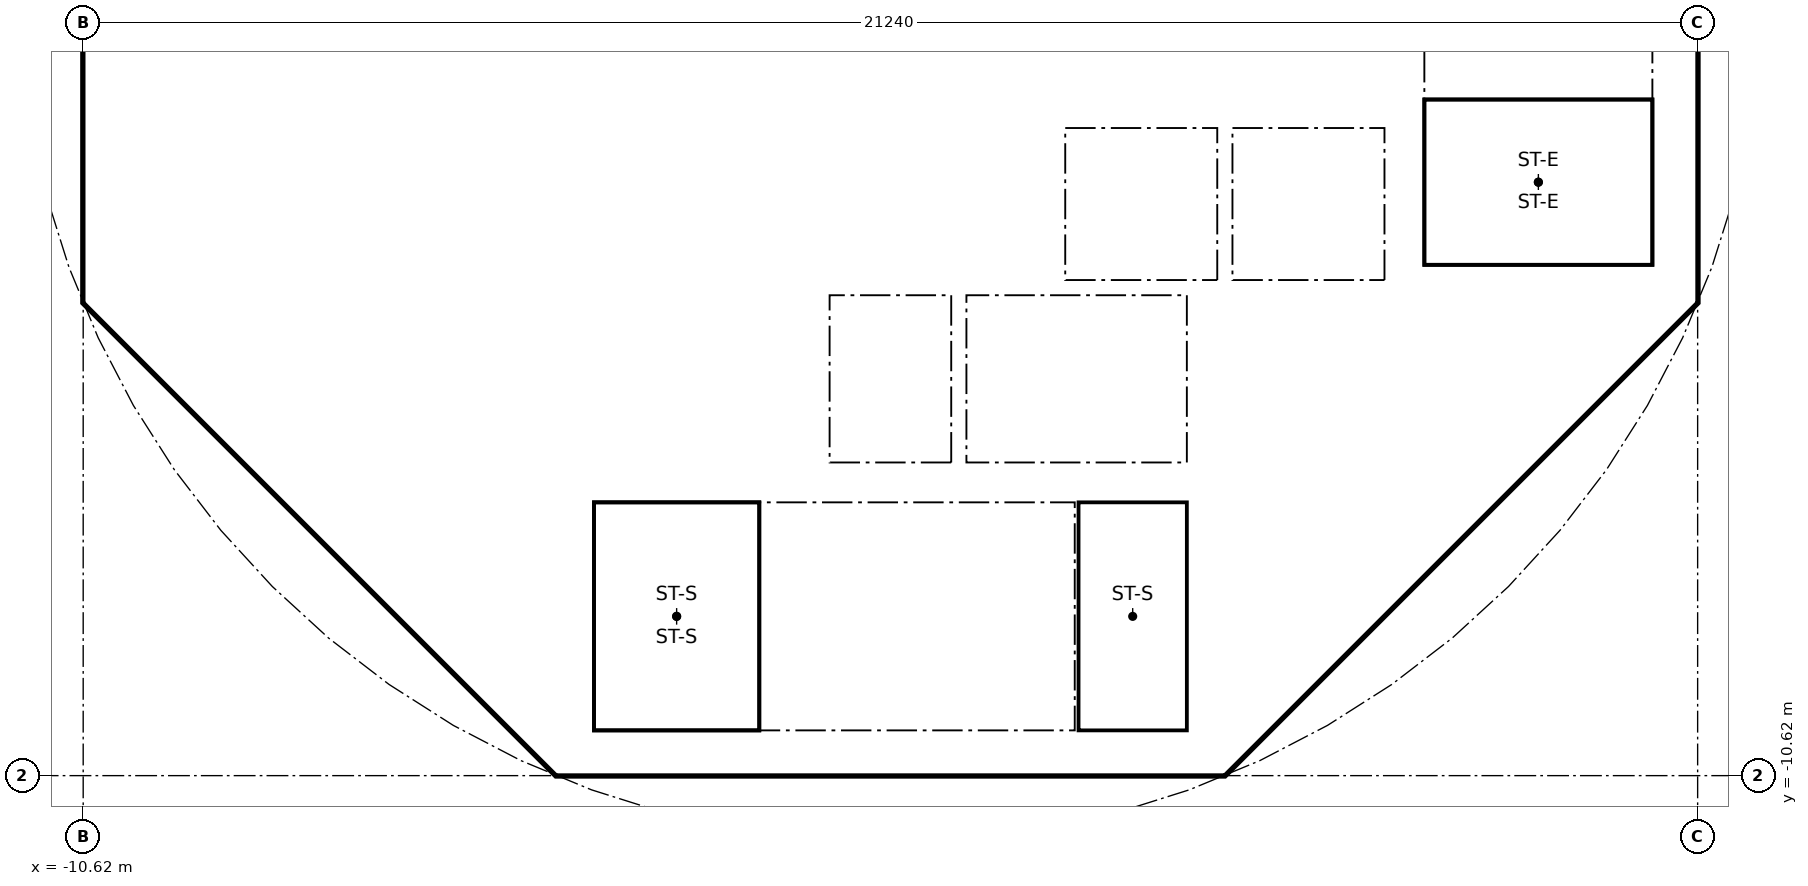
"""IFC4 building model, lengths in metres.
Left out: names, types, materials, properties, quantities, classifications, styles, units other than length and angle.
Written with IfcOpenShell. Run it as: python <this file> out.ifc"""

import sys

from ifc_helpers import new_model, si_unit, direction, frame, frame_2d, origin, place, context, subcontext, project, spatial, polyline, rectangle, outline, extrude, element, fill, save


model = new_model("IFC4")
c1 = context("Model", 3, precision=1e-05, world=origin(), true_north=direction((0.0, 1.0)))
c2 = subcontext(c1, "Body", "Model", "MODEL_VIEW")
j1 = project(units=[si_unit("LENGTHUNIT", "METRE"), si_unit("PLANEANGLEUNIT", "RADIAN")], contexts=[c1])
p1 = place(None, origin())
s1 = spatial("IfcSite", under=j1, at=p1, CompositionType="ELEMENT")
p2 = place(p1, origin())
s2 = spatial("IfcBuilding", under=s1, at=p2, CompositionType="ELEMENT")
p3 = place(p2, frame((0.0, 0.0, 299.2)))
s3 = spatial("IfcBuildingStorey", under=s2, at=p3, CompositionType="ELEMENT", Elevation=299.2)
p4 = place(p3, frame((-10.325, 3.801, 0.0), z_axis=(0.0, 0.0, 1.0), x_axis=(0.0, -1.0, 0.0)))
e1 = element("IfcWall", 1, at=p4, inside=s3, PredefinedType="SHEAR", context=c2, shape_type="SweptSolid", body=[
    extrude(rectangle(XDim=7.602, YDim=0.6, at=frame_2d((3.801, 0.0))), origin(), (0.0, 0.0, 1.0), 10.75),
])
p5 = place(p4, frame((0.651, 0.0, 0.0)))
e2 = element("IfcOpeningElement", 2, at=p5, cuts=e1, PredefinedType="OPENING", context=c2, shape_type="SweptSolid", body=[
    extrude(rectangle(XDim=1.5, YDim=2.1, at=frame_2d((0.75, 1.05))), frame((0.0, 0.31, 0.0), z_axis=(0.0, -1.0, 0.0), x_axis=(1.0, 0.0, 0.0)), (0.0, 0.0, 1.0), 0.62),
])
p6 = place(p4, frame((5.451, 0.0, 0.0)))
e3 = element("IfcOpeningElement", 3, at=p6, cuts=e1, PredefinedType="OPENING", context=c2, shape_type="SweptSolid", body=[
    extrude(rectangle(XDim=1.5, YDim=2.1, at=frame_2d((0.75, 1.05))), frame((0.0, 0.31, 0.0), z_axis=(0.0, -1.0, 0.0), x_axis=(1.0, 0.0, 0.0)), (0.0, 0.0, 1.0), 0.62),
])
p7 = place(p3, frame((-9.988, -4.613, 0.0), z_axis=(0.0, 0.0, 1.0), x_axis=(0.707106781187, -0.707106781187, 0.0)))
e4 = element("IfcWall", 4, at=p7, inside=s3, PredefinedType="SHEAR", context=c2, shape_type="SweptSolid", body=[
    extrude(rectangle(XDim=7.602, YDim=0.6, at=frame_2d((3.801, 0.0))), origin(), (0.0, 0.0, 1.0), 10.75),
])
p8 = place(p7, frame((6.151, 0.0, 0.0)))
e5 = element("IfcOpeningElement", 5, at=p8, cuts=e4, PredefinedType="OPENING", context=c2, shape_type="SweptSolid", body=[
    extrude(rectangle(XDim=1.1, YDim=2.1, at=frame_2d((0.55, 1.05))), frame((0.0, 0.31, 0.0), z_axis=(0.0, -1.0, 0.0), x_axis=(1.0, 0.0, 0.0)), (0.0, 0.0, 1.0), 0.62),
])
p9 = place(p3, frame((4.613, -9.988, 0.0), z_axis=(0.0, 0.0, 1.0), x_axis=(0.707106781187, 0.707106781187, 0.0)))
e6 = element("IfcWall", 6, at=p9, inside=s3, PredefinedType="SHEAR", context=c2, shape_type="SweptSolid", body=[
    extrude(rectangle(XDim=7.602, YDim=0.6, at=frame_2d((3.801, 0.0))), origin(), (0.0, 0.0, 1.0), 10.75),
])
p10 = place(p9, frame((3.201, 0.0, 0.0)))
e7 = element("IfcOpeningElement", 7, at=p10, cuts=e6, PredefinedType="OPENING", context=c2, shape_type="SweptSolid", body=[
    extrude(rectangle(XDim=1.2, YDim=2.1, at=frame_2d((0.6, 1.05))), frame((0.0, 0.31, 0.0), z_axis=(0.0, -1.0, 0.0), x_axis=(1.0, 0.0, 0.0)), (0.0, 0.0, 1.0), 0.62),
])
p11 = place(p3, frame((4.0, -10.025, 0.0), z_axis=(0.0, 0.0, 1.0), x_axis=(0.0, 1.0, 0.0)))
e8 = element("IfcWall", 8, at=p11, inside=s3, PredefinedType="SOLIDWALL", context=c2, shape_type="SweptSolid", body=[
    extrude(rectangle(XDim=3.0, YDim=0.2, at=frame_2d((1.5, 0.0))), origin(), (0.0, 0.0, 1.0), 10.75),
])
p12 = place(p11, frame((0.975, 0.0, 0.0)))
e9 = element("IfcOpeningElement", 9, at=p12, cuts=e8, PredefinedType="OPENING", context=c2, shape_type="SweptSolid", body=[
    extrude(rectangle(XDim=1.1, YDim=2.1, at=frame_2d((0.55, 1.05))), frame((0.0, 0.11, 0.0), z_axis=(0.0, -1.0, 0.0), x_axis=(1.0, 0.0, 0.0)), (0.0, 0.0, 1.0), 0.22),
])
p13 = place(p3, frame((-7.0, -7.027, 0.0), z_axis=(0.0, 0.0, 1.0), x_axis=(0.0, 1.0, 0.0)))
e10 = element("IfcWall", 10, at=p13, inside=s3, PredefinedType="PARTITIONING", context=c2, shape_type="SweptSolid", body=[
    extrude(rectangle(XDim=2.927, YDim=0.15, at=frame_2d((1.463, 0.0))), origin(), (0.0, 0.0, 1.0), 10.75),
])
p14 = place(p13, frame((0.976, 0.0, 0.0)))
e11 = element("IfcOpeningElement", 11, at=p14, cuts=e10, PredefinedType="OPENING", context=c2, shape_type="SweptSolid", body=[
    extrude(rectangle(XDim=0.9, YDim=2.1, at=frame_2d((0.45, 1.05))), frame((0.0, 0.085, 0.0), z_axis=(0.0, -1.0, 0.0), x_axis=(1.0, 0.0, 0.0)), (0.0, 0.0, 1.0), 0.17),
])
p15 = place(p3, frame((4.0, -6.5, 0.0), z_axis=(0.0, 0.0, 1.0), x_axis=(0.0, 1.0, 0.0)))
e12 = element("IfcWall", 12, at=p15, inside=s3, PredefinedType="SOLIDWALL", context=c2, shape_type="SweptSolid", body=[
    extrude(rectangle(XDim=2.2, YDim=0.2, at=frame_2d((1.1, 0.0))), origin(), (0.0, 0.0, 1.0), 10.75),
])
p16 = place(p15, frame((0.55, 0.0, 0.0)))
e13 = element("IfcOpeningElement", 13, at=p16, cuts=e12, PredefinedType="OPENING", context=c2, shape_type="SweptSolid", body=[
    extrude(rectangle(XDim=1.1, YDim=2.1, at=frame_2d((0.55, 1.05))), frame((0.0, 0.11, 0.0), z_axis=(0.0, -1.0, 0.0), x_axis=(1.0, 0.0, 0.0)), (0.0, 0.0, 1.0), 0.22),
])
p17 = place(p3, frame((-4.0, -6.5, 0.0), z_axis=(0.0, 0.0, 1.0), x_axis=(0.0, 1.0, 0.0)))
e14 = element("IfcWall", 14, at=p17, inside=s3, PredefinedType="SOLIDWALL", context=c2, shape_type="SweptSolid", body=[
    extrude(rectangle(XDim=2.2, YDim=0.2, at=frame_2d((1.1, 0.0))), origin(), (0.0, 0.0, 1.0), 10.75),
])
p18 = place(p17, frame((0.65, 0.0, 0.0)))
e15 = element("IfcOpeningElement", 15, at=p18, cuts=e14, PredefinedType="OPENING", context=c2, shape_type="SweptSolid", body=[
    extrude(rectangle(XDim=0.9, YDim=2.1, at=frame_2d((0.45, 1.05))), frame((0.0, 0.11, 0.0), z_axis=(0.0, -1.0, 0.0), x_axis=(1.0, 0.0, 0.0)), (0.0, 0.0, 1.0), 0.22),
])
p19 = place(p3, frame((-6.7, -2.0, 0.0), z_axis=(0.0, 0.0, 1.0), x_axis=(1.0, 0.0, 0.0)))
e16 = element("IfcWall", 16, at=p19, inside=s3, PredefinedType="SOLIDWALL", context=c2, shape_type="SweptSolid", body=[
    extrude(rectangle(XDim=13.4, YDim=0.2, at=frame_2d((6.7, 0.0))), origin(), (0.0, 0.0, 1.0), 10.75),
])
p20 = place(p19, frame((9.45, 0.0, 0.0)))
e17 = element("IfcOpeningElement", 17, at=p20, cuts=e16, PredefinedType="OPENING", context=c2, shape_type="SweptSolid", body=[
    extrude(rectangle(XDim=1.1, YDim=2.1, at=frame_2d((0.55, 1.05))), frame((0.0, 0.11, 0.0), z_axis=(0.0, -1.0, 0.0), x_axis=(1.0, 0.0, 0.0)), (0.0, 0.0, 1.0), 0.22),
])
p21 = place(p19, frame((11.65, 0.0, 0.0)))
e18 = element("IfcOpeningElement", 18, at=p21, cuts=e16, PredefinedType="OPENING", context=c2, shape_type="SweptSolid", body=[
    extrude(rectangle(XDim=1.1, YDim=2.1, at=frame_2d((0.55, 1.05))), frame((0.0, 0.11, 0.0), z_axis=(0.0, -1.0, 0.0), x_axis=(1.0, 0.0, 0.0)), (0.0, 0.0, 1.0), 0.22),
])
p22 = place(p19, frame((1.85, 0.0, 0.0)))
e19 = element("IfcOpeningElement", 19, at=p22, cuts=e16, PredefinedType="OPENING", context=c2, shape_type="SweptSolid", body=[
    extrude(rectangle(XDim=0.9, YDim=2.1, at=frame_2d((0.45, 1.05))), frame((0.0, 0.11, 0.0), z_axis=(0.0, -1.0, 0.0), x_axis=(1.0, 0.0, 0.0)), (0.0, 0.0, 1.0), 0.22),
])
p23 = place(p19, frame((6.25, 0.0, 0.0)))
e20 = element("IfcOpeningElement", 20, at=p23, cuts=e16, PredefinedType="OPENING", context=c2, shape_type="SweptSolid", body=[
    extrude(rectangle(XDim=0.9, YDim=2.1, at=frame_2d((0.45, 1.05))), frame((0.0, 0.11, 0.0), z_axis=(0.0, -1.0, 0.0), x_axis=(1.0, 0.0, 0.0)), (0.0, 0.0, 1.0), 0.22),
])
p24 = place(p3, origin())
e21 = element("IfcWall", 21, at=p24, inside=s3, PredefinedType="SHEAR", context=c2, shape_type="SweptSolid", body=[
    extrude(outline(polyline([(-10.625, -3.801), (-10.025, -3.801), (-10.025, -4.152), (-9.776, -4.401), (-10.2, -4.825), (-10.625, -4.401), (-10.625, -3.801)])), origin(), (0.0, 0.0, 1.0), 10.75),
])
p25 = place(p3, origin())
e22 = element("IfcWall", 22, at=p25, inside=s3, PredefinedType="SHEAR", context=c2, shape_type="SweptSolid", body=[
    extrude(outline(polyline([(-4.152, -10.025), (4.152, -10.025), (4.401, -9.776), (4.825, -10.2), (4.401, -10.625), (-4.401, -10.625), (-4.825, -10.2), (-4.401, -9.776), (-4.152, -10.025)])), origin(), (0.0, 0.0, 1.0), 10.75),
])
p26 = place(p3, origin())
e23 = element("IfcWall", 23, at=p26, inside=s3, PredefinedType="SHEAR", context=c2, shape_type="SweptSolid", body=[
    extrude(outline(polyline([(9.776, -4.401), (10.025, -4.152), (10.025, -3.801), (10.025, 4.152), (9.776, 4.401), (10.2, 4.825), (10.625, 4.401), (10.625, -4.401), (10.2, -4.825), (9.776, -4.401)])), origin(), (0.0, 0.0, 1.0), 10.75),
])
for number, where, z_axis, x_axis in (
    (24, (-0.9, -6.5, 0.0), (0.0, 0.0, 1.0), (0.0, 1.0, 0.0)),
    (25, (0.9, -6.5, 0.0), (0.0, 0.0, 1.0), (0.0, 1.0, 0.0)),
):
    element("IfcWall", number, at=place(p3, frame(where, z_axis=z_axis, x_axis=x_axis)), inside=s3, PredefinedType="SOLIDWALL", context=c2, shape_type="SweptSolid", body=[
        extrude(rectangle(XDim=2.2, YDim=0.2, at=frame_2d((1.1, 0.0))), origin(), (0.0, 0.0, 1.0), 10.75),
    ])
p27 = place(p3, origin())
e26 = element("IfcWall", 26, at=p27, inside=s3, PredefinedType="SOLIDWALL", context=c2, shape_type="SweptSolid", body=[
    extrude(outline(polyline([(-6.7, -2.1), (-6.5, -2.1), (-6.5, -4.1), (-2.3, -4.1), (-2.3, -2.1), (-2.1, -2.1), (-2.1, -4.1), (2.1, -4.1), (2.1, -2.1), (2.3, -2.1), (2.3, -4.1), (4.3, -4.1), (4.3, -2.1), (4.5, -2.1), (4.5, -4.1), (6.5, -4.1), (6.5, -2.1), (6.7, -2.1), (6.7, -4.3), (-6.7, -4.3), (-6.7, -2.1)])), origin(), (0.0, 0.0, 1.0), 10.75),
])
p28 = place(p3, frame((-10.025, -4.0, 0.0), z_axis=(0.0, 0.0, 1.0), x_axis=(1.0, 0.0, 0.0)))
e27 = element("IfcWall", 27, at=p28, inside=s3, PredefinedType="PARTITIONING", context=c2, shape_type="SweptSolid", body=[
    extrude(rectangle(XDim=3.325, YDim=0.2, at=frame_2d((1.662, 0.0))), origin(), (0.0, 0.0, 1.0), 10.75),
])
p29 = place(p3, origin())
e28 = element("IfcWall", 28, at=p29, inside=s3, PredefinedType="SOLIDWALL", context=c2, shape_type="SweptSolid", body=[
    extrude(outline(polyline([(-3.9, -10.025), (-4.1, -10.025), (-4.1, -7.025), (-3.9, -7.025), (-3.9, -10.025)])), origin(), (0.0, 0.0, 1.0), 10.75),
])
p30 = place(p3, origin())
e29 = element("IfcWall", 29, at=p30, inside=s3, PredefinedType="SOLIDWALL", context=c2, shape_type="SweptSolid", body=[
    extrude(outline(polyline([(4.1, -7.025), (-4.1, -7.025), (-4.1, -6.5), (4.1, -6.5), (4.1, -7.025)])), origin(), (0.0, 0.0, 1.0), 10.75),
])
p31 = place(p3, origin())
e30 = element("IfcWall", 30, at=p31, inside=s3, PredefinedType="SOLIDWALL", context=c2, shape_type="SweptSolid", body=[
    extrude(outline(polyline([(7.025, -3.9), (6.7, -3.9), (6.7, 3.9), (7.025, 3.9), (7.025, -3.9)])), origin(), (0.0, 0.0, 1.0), 10.75),
])
p32 = place(p3, origin())
e31 = element("IfcWall", 31, at=p32, inside=s3, PredefinedType="SOLIDWALL", context=c2, shape_type="SweptSolid", body=[
    extrude(outline(polyline([(10.025, -4.1), (6.7, -4.1), (6.7, -3.9), (10.025, -3.9), (10.025, -4.1)])), origin(), (0.0, 0.0, 1.0), 10.75),
])
p33 = place(p20, origin())
e32 = element("IfcDoor", 32, at=p33, inside=s3, OperationType="DOUBLE_DOOR_SLIDING", PredefinedType="DOOR", context=c2, shape_type="SweptSolid", body=[
    extrude(rectangle(XDim=1.1, YDim=2.1, at=frame_2d((0.55, 1.05))), frame((0.0, 0.025, 0.0), z_axis=(0.0, -1.0, 0.0), x_axis=(1.0, 0.0, 0.0)), (0.0, 0.0, 1.0), 0.05),
])
fill(e17, e32)
p34 = place(p21, origin())
e33 = element("IfcDoor", 33, at=p34, inside=s3, OperationType="DOUBLE_DOOR_SLIDING", PredefinedType="DOOR", context=c2, shape_type="SweptSolid", body=[
    extrude(rectangle(XDim=1.1, YDim=2.1, at=frame_2d((0.55, 1.05))), frame((0.0, 0.025, 0.0), z_axis=(0.0, -1.0, 0.0), x_axis=(1.0, 0.0, 0.0)), (0.0, 0.0, 1.0), 0.05),
])
fill(e18, e33)
p35 = place(p16, origin())
e34 = element("IfcDoor", 34, at=p35, inside=s3, OperationType="DOUBLE_DOOR_SLIDING", PredefinedType="DOOR", context=c2, shape_type="SweptSolid", body=[
    extrude(rectangle(XDim=1.1, YDim=2.1, at=frame_2d((0.55, 1.05))), frame((0.0, 0.025, 0.0), z_axis=(0.0, -1.0, 0.0), x_axis=(1.0, 0.0, 0.0)), (0.0, 0.0, 1.0), 0.05),
])
fill(e13, e34)
p36 = place(p12, origin())
e35 = element("IfcDoor", 35, at=p36, inside=s3, OperationType="SINGLE_SWING_LEFT", PredefinedType="DOOR", context=c2, shape_type="SweptSolid", body=[
    extrude(rectangle(XDim=1.1, YDim=2.1, at=frame_2d((0.55, 1.05))), frame((0.0, 0.025, 0.0), z_axis=(0.0, -1.0, 0.0), x_axis=(1.0, 0.0, 0.0)), (0.0, 0.0, 1.0), 0.05),
])
fill(e9, e35)
p37 = place(p14, origin())
e36 = element("IfcDoor", 36, at=p37, inside=s3, OperationType="SINGLE_SWING_LEFT", PredefinedType="DOOR", context=c2, shape_type="SweptSolid", body=[
    extrude(rectangle(XDim=0.9, YDim=2.1, at=frame_2d((0.45, 1.05))), frame((0.0, 0.025, 0.0), z_axis=(0.0, -1.0, 0.0), x_axis=(1.0, 0.0, 0.0)), (0.0, 0.0, 1.0), 0.05),
])
fill(e11, e36)
p38 = place(p18, frame((0.9, 0.0, 0.0), x_axis=(-1.0, 0.0, 0.0)))
e37 = element("IfcDoor", 37, at=p38, inside=s3, OperationType="SINGLE_SWING_RIGHT", PredefinedType="DOOR", context=c2, shape_type="SweptSolid", body=[
    extrude(rectangle(XDim=0.9, YDim=2.1, at=frame_2d((0.45, 1.05))), frame((0.0, 0.025, 0.0), z_axis=(0.0, -1.0, 0.0), x_axis=(1.0, 0.0, 0.0)), (0.0, 0.0, 1.0), 0.05),
])
fill(e15, e37)
p39 = place(p22, frame((0.9, 0.0, 0.0), x_axis=(-1.0, 0.0, 0.0)))
e38 = element("IfcDoor", 38, at=p39, inside=s3, OperationType="SINGLE_SWING_LEFT", PredefinedType="DOOR", context=c2, shape_type="SweptSolid", body=[
    extrude(rectangle(XDim=0.9, YDim=2.1, at=frame_2d((0.45, 1.05))), frame((0.0, 0.025, 0.0), z_axis=(0.0, -1.0, 0.0), x_axis=(1.0, 0.0, 0.0)), (0.0, 0.0, 1.0), 0.05),
])
fill(e19, e38)
p40 = place(p23, frame((0.9, 0.0, 0.0), x_axis=(-1.0, 0.0, 0.0)))
e39 = element("IfcDoor", 39, at=p40, inside=s3, OperationType="SINGLE_SWING_LEFT", PredefinedType="DOOR", context=c2, shape_type="SweptSolid", body=[
    extrude(rectangle(XDim=0.9, YDim=2.1, at=frame_2d((0.45, 1.05))), frame((0.0, 0.025, 0.0), z_axis=(0.0, -1.0, 0.0), x_axis=(1.0, 0.0, 0.0)), (0.0, 0.0, 1.0), 0.05),
])
fill(e20, e39)
p41 = place(p10, origin())
e40 = element("IfcDoor", 40, at=p41, inside=s3, OperationType="SINGLE_SWING_LEFT", PredefinedType="DOOR", context=c2, shape_type="SweptSolid", body=[
    extrude(rectangle(XDim=1.2, YDim=2.1, at=frame_2d((0.6, 1.05))), frame((0.0, 0.025, 0.0), z_axis=(0.0, -1.0, 0.0), x_axis=(1.0, 0.0, 0.0)), (0.0, 0.0, 1.0), 0.05),
])
fill(e7, e40)
p42 = place(p6, origin())
e41 = element("IfcDoor", 41, at=p42, inside=s3, OperationType="DOUBLE_DOOR_SINGLE_SWING", PredefinedType="DOOR", context=c2, shape_type="SweptSolid", body=[
    extrude(rectangle(XDim=1.5, YDim=2.1, at=frame_2d((0.75, 1.05))), frame((0.0, 0.025, 0.0), z_axis=(0.0, -1.0, 0.0), x_axis=(1.0, 0.0, 0.0)), (0.0, 0.0, 1.0), 0.05),
])
fill(e3, e41)
p43 = place(p8, origin())
e42 = element("IfcDoor", 42, at=p43, inside=s3, OperationType="SINGLE_SWING_LEFT", PredefinedType="DOOR", context=c2, shape_type="SweptSolid", body=[
    extrude(rectangle(XDim=1.1, YDim=2.1, at=frame_2d((0.55, 1.05))), frame((0.0, 0.025, 0.0), z_axis=(0.0, -1.0, 0.0), x_axis=(1.0, 0.0, 0.0)), (0.0, 0.0, 1.0), 0.05),
])
fill(e5, e42)
save(model, sys.argv[1])
